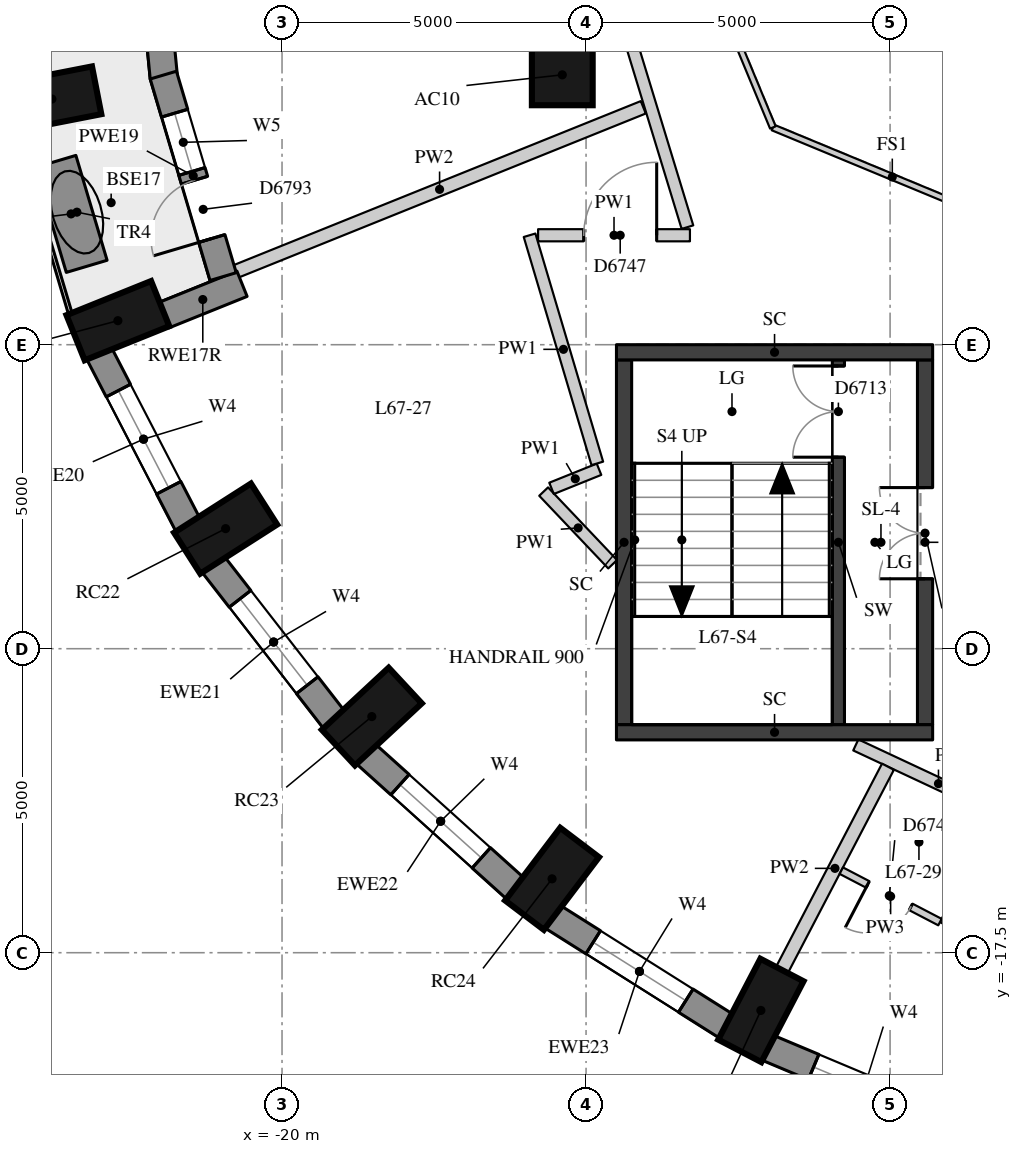
"""IFC4 building model, lengths in metres.
Left out: names, types, materials, properties, quantities, classifications, styles, units other than length and angle.
Written with IfcOpenShell. Run it as: python <this file> out.ifc"""

import sys

from ifc_helpers import new_model, si_unit, direction, frame, frame_2d, origin, origin_2d, place, context, subcontext, project, spatial, rectangle, extrude, element, fill, save


model = new_model("IFC4")
c1 = context("Model", 3, precision=1e-05, world=origin(), true_north=direction((0.0, 1.0)))
c2 = subcontext(c1, "Body", "Model", "MODEL_VIEW")
j1 = project(units=[si_unit("LENGTHUNIT", "METRE"), si_unit("PLANEANGLEUNIT", "RADIAN")], contexts=[c1])
p1 = place(None, origin())
s1 = spatial("IfcSite", under=j1, at=p1, CompositionType="ELEMENT")
p2 = place(p1, origin())
s2 = spatial("IfcBuilding", under=s1, at=p2, CompositionType="ELEMENT")
p3 = place(p2, frame((0.0, 0.0, 236.6)))
s3 = spatial("IfcBuildingStorey", under=s2, at=p3, CompositionType="ELEMENT", Elevation=236.6)
for number, where, z_axis, x_axis in (
    (1, (-23.785, -3.459, 0.0), (0.0, 0.0, 1.0), (-0.981, -0.192, 0.0)),
    (2, (-22.7, -7.105, 0.0), (0.0, 0.0, 1.0), (-0.928, -0.374, 0.0)),
    (3, (-20.928, -10.525, 0.0), (0.0, 0.0, 1.0), (-0.843, -0.539, 0.0)),
    (4, (-18.523, -13.616, 0.0), (0.0, 0.0, 1.0), (-0.733, -0.681, 0.0)),
    (5, (-15.559, -16.285, 0.0), (0.0, 0.0, 1.0), (-0.604, -0.797, 0.0)),
    (6, (-12.125, -18.449, 0.0), (0.0, 0.0, 1.0), (-0.462, -0.887, 0.0)),
):
    element("IfcColumn", number, at=place(p3, frame(where, z_axis=z_axis, x_axis=x_axis)), inside=s3, PredefinedType="COLUMN", context=c2, shape_type="SweptSolid", body=[
        extrude(rectangle(XDim=1.5, YDim=0.8, at=origin_2d()), origin(), (0.0, 0.0, 1.0), 3.3),
    ])
p4 = place(p3, frame((-15.391, -3.062, 0.0), z_axis=(0.0, 0.0, 1.0), x_axis=(1.0, 0.0, 0.0)))
e7 = element("IfcColumn", 7, at=p4, inside=s3, PredefinedType="COLUMN", context=c2, shape_type="SweptSolid", body=[
    extrude(rectangle(XDim=1.0, YDim=1.0, at=origin_2d()), origin(), (0.0, 0.0, 1.0), 3.3),
])
p5 = place(p3, frame((-23.01, -7.64, 0.0), z_axis=(0.0, 0.0, 1.0), x_axis=(0.459921155255, -0.887959757505, 0.0)))
e8 = element("IfcWall", 8, at=p5, inside=s3, PredefinedType="SOLIDWALL", context=c2, shape_type="SweptSolid", body=[
    extrude(rectangle(XDim=3.186, YDim=0.45, at=frame_2d((1.593, 0.0))), origin(), (0.0, 0.0, 1.0), 3.02),
])
p6 = place(p5, frame((0.693, 0.0, 0.4)))
e9 = element("IfcOpeningElement", 9, at=p6, cuts=e8, PredefinedType="OPENING", context=c2, shape_type="SweptSolid", body=[
    extrude(rectangle(XDim=1.8, YDim=1.75, at=frame_2d((0.9, 0.875))), frame((0.0, 0.235, 0.0), z_axis=(0.0, -1.0, 0.0), x_axis=(1.0, 0.0, 0.0)), (0.0, 0.0, 1.0), 0.47),
])
p7 = place(p3, frame((-21.135, -11.109, 0.0), z_axis=(0.0, 0.0, 1.0), x_axis=(0.613898970825, -0.789384604372, 0.0)))
e10 = element("IfcWall", 10, at=p7, inside=s3, PredefinedType="SOLIDWALL", context=c2, shape_type="SweptSolid", body=[
    extrude(rectangle(XDim=3.247, YDim=0.45, at=frame_2d((1.624, 0.0))), origin(), (0.0, 0.0, 1.0), 3.02),
])
p8 = place(p7, frame((0.724, 0.0, 0.4)))
e11 = element("IfcOpeningElement", 11, at=p8, cuts=e10, PredefinedType="OPENING", context=c2, shape_type="SweptSolid", body=[
    extrude(rectangle(XDim=1.8, YDim=1.75, at=frame_2d((0.9, 0.875))), frame((0.0, 0.235, 0.0), z_axis=(0.0, -1.0, 0.0), x_axis=(1.0, 0.0, 0.0)), (0.0, 0.0, 1.0), 0.47),
])
p9 = place(p3, frame((-18.624, -14.229, 0.0), z_axis=(0.0, 0.0, 1.0), x_axis=(0.743166014219, -0.669107073128, 0.0)))
e12 = element("IfcWall", 12, at=p9, inside=s3, PredefinedType="SOLIDWALL", context=c2, shape_type="SweptSolid", body=[
    extrude(rectangle(XDim=3.316, YDim=0.45, at=frame_2d((1.658, 0.0))), origin(), (0.0, 0.0, 1.0), 3.02),
])
p10 = place(p9, frame((0.758, 0.0, 0.4)))
e13 = element("IfcOpeningElement", 13, at=p10, cuts=e12, PredefinedType="OPENING", context=c2, shape_type="SweptSolid", body=[
    extrude(rectangle(XDim=1.8, YDim=1.75, at=frame_2d((0.9, 0.875))), frame((0.0, 0.235, 0.0), z_axis=(0.0, -1.0, 0.0), x_axis=(1.0, 0.0, 0.0)), (0.0, 0.0, 1.0), 0.47),
])
p11 = place(p3, frame((-15.553, -16.906, 0.0), z_axis=(0.0, 0.0, 1.0), x_axis=(0.845929139811, -0.53329531258, 0.0)))
e14 = element("IfcWall", 14, at=p11, inside=s3, PredefinedType="SOLIDWALL", context=c2, shape_type="SweptSolid", body=[
    extrude(rectangle(XDim=3.385, YDim=0.45, at=frame_2d((1.692, 0.0))), origin(), (0.0, 0.0, 1.0), 3.02),
])
p12 = place(p11, frame((0.792, 0.0, 0.4)))
e15 = element("IfcOpeningElement", 15, at=p12, cuts=e14, PredefinedType="OPENING", context=c2, shape_type="SweptSolid", body=[
    extrude(rectangle(XDim=1.8, YDim=1.75, at=frame_2d((0.9, 0.875))), frame((0.0, 0.235, 0.0), z_axis=(0.0, -1.0, 0.0), x_axis=(1.0, 0.0, 0.0)), (0.0, 0.0, 1.0), 0.47),
])
p13 = place(p3, frame((-12.016, -19.062, 0.0), z_axis=(0.0, 0.0, 1.0), x_axis=(0.922049934692, -0.3870709469, 0.0)))
e16 = element("IfcWall", 16, at=p13, inside=s3, PredefinedType="SOLIDWALL", context=c2, shape_type="SweptSolid", body=[
    extrude(rectangle(XDim=3.443, YDim=0.45, at=frame_2d((1.722, 0.0))), origin(), (0.0, 0.0, 1.0), 3.02),
])
p14 = place(p13, frame((0.822, 0.0, 0.4)))
e17 = element("IfcOpeningElement", 17, at=p14, cuts=e16, PredefinedType="OPENING", context=c2, shape_type="SweptSolid", body=[
    extrude(rectangle(XDim=1.8, YDim=1.75, at=frame_2d((0.9, 0.875))), frame((0.0, 0.235, 0.0), z_axis=(0.0, -1.0, 0.0), x_axis=(1.0, 0.0, 0.0)), (0.0, 0.0, 1.0), 0.47),
])
p15 = place(p3, frame((-21.948, -7.017, 0.0), z_axis=(0.0, 0.0, 1.0), x_axis=(0.927577935879, 0.373629726964, 0.0)))
e18 = element("IfcWall", 18, at=p15, inside=s3, PredefinedType="SOLIDWALL", context=c2, shape_type="SweptSolid", body=[
    extrude(rectangle(XDim=1.39, YDim=0.45, at=frame_2d((0.695, 0.0))), origin(), (0.0, 0.0, 1.0), 3.02),
])
p16 = place(p3, frame((-22.276, 0.322, 0.0), z_axis=(0.0, 0.0, 1.0), x_axis=(0.096423819494, -0.995340367429, 0.0)))
e19 = element("IfcWall", 19, at=p16, inside=s3, PredefinedType="SOLIDWALL", context=c2, shape_type="SweptSolid", body=[
    extrude(rectangle(XDim=3.446, YDim=0.45, at=frame_2d((1.723, 0.0))), origin(), (0.0, 0.0, 1.0), 3.02),
])
p17 = place(p16, frame((0.648, 0.0, 0.4)))
e20 = element("IfcOpeningElement", 20, at=p17, cuts=e19, PredefinedType="OPENING", context=c2, shape_type="SweptSolid", body=[
    extrude(rectangle(XDim=1.0, YDim=1.75, at=frame_2d((0.5, 0.875))), frame((0.0, 0.235, 0.0), z_axis=(0.0, -1.0, 0.0), x_axis=(1.0, 0.0, 0.0)), (0.0, 0.0, 1.0), 0.47),
])
p18 = place(p16, frame((1.798, 0.0, 0.0)))
e21 = element("IfcOpeningElement", 21, at=p18, cuts=e19, PredefinedType="OPENING", context=c2, shape_type="SweptSolid", body=[
    extrude(rectangle(XDim=1.0, YDim=2.15, at=frame_2d((0.5, 1.075))), frame((0.0, 0.235, 0.0), z_axis=(0.0, -1.0, 0.0), x_axis=(1.0, 0.0, 0.0)), (0.0, 0.0, 1.0), 0.47),
])
p19 = place(p3, frame((-21.952, -3.066, 0.0), z_axis=(0.0, 0.0, 1.0), x_axis=(0.284437019833, -0.958694728132, 0.0)))
e22 = element("IfcWall", 22, at=p19, inside=s3, PredefinedType="SOLIDWALL", context=c2, shape_type="SweptSolid", body=[
    extrude(rectangle(XDim=3.457, YDim=0.45, at=frame_2d((1.728, 0.0))), origin(), (0.0, 0.0, 1.0), 3.02),
])
p20 = place(p19, frame((0.653, 0.0, 0.4)))
e23 = element("IfcOpeningElement", 23, at=p20, cuts=e22, PredefinedType="OPENING", context=c2, shape_type="SweptSolid", body=[
    extrude(rectangle(XDim=1.0, YDim=1.75, at=frame_2d((0.5, 0.875))), frame((0.0, 0.235, 0.0), z_axis=(0.0, -1.0, 0.0), x_axis=(1.0, 0.0, 0.0)), (0.0, 0.0, 1.0), 0.47),
])
p21 = place(p19, frame((1.803, 0.0, 0.0)))
e24 = element("IfcOpeningElement", 24, at=p21, cuts=e22, PredefinedType="OPENING", context=c2, shape_type="SweptSolid", body=[
    extrude(rectangle(XDim=1.0, YDim=2.15, at=frame_2d((0.5, 1.075))), frame((0.0, 0.235, 0.0), z_axis=(0.0, -1.0, 0.0), x_axis=(1.0, 0.0, 0.0)), (0.0, 0.0, 1.0), 0.47),
])
p22 = place(p3, frame((-23.726, -4.486, 0.0), z_axis=(0.0, 0.0, 1.0), x_axis=(0.285219480859, -0.958462230731, 0.0)))
e25 = element("IfcWall", 25, at=p22, inside=s3, PredefinedType="USERDEFINED", context=c2, shape_type="SweptSolid", body=[
    extrude(rectangle(XDim=1.8, YDim=0.7, at=frame_2d((0.9, 0.0))), origin(), (0.0, 0.0, 1.0), 0.75),
])
p23 = place(p3, frame((-10.85, -13.75, 0.0), z_axis=(0.0, 0.0, 1.0), x_axis=(0.0, 1.0, 0.0)))
e26 = element("IfcWall", 26, at=p23, inside=s3, PredefinedType="SHEAR", context=c2, shape_type="SweptSolid", body=[
    extrude(rectangle(XDim=6.0, YDim=0.2, at=frame_2d((3.0, 0.0))), origin(), (0.0, 0.0, 1.0), 3.02),
])
p24 = place(p23, frame((4.4, 0.0, 0.0)))
e27 = element("IfcOpeningElement", 27, at=p24, cuts=e26, PredefinedType="OPENING", context=c2, shape_type="SweptSolid", body=[
    extrude(rectangle(XDim=1.5, YDim=2.1, at=frame_2d((0.75, 1.05))), frame((0.0, 0.11, 0.0), z_axis=(0.0, -1.0, 0.0), x_axis=(1.0, 0.0, 0.0)), (0.0, 0.0, 1.0), 0.22),
])
p25 = place(p3, frame((-14.375, -13.75, -0.28), z_axis=(0.0, 0.0, 1.0), x_axis=(0.0, 1.0, 0.0)))
e28 = element("IfcWall", 28, at=p25, inside=s3, PredefinedType="SHEAR", context=c2, shape_type="SweptSolid", body=[
    extrude(rectangle(XDim=6.0, YDim=0.25, at=frame_2d((3.0, 0.0))), origin(), (0.0, 0.0, 1.0), 3.3),
])
p26 = place(p3, frame((-9.425, -13.75, -0.28), z_axis=(0.0, 0.0, 1.0), x_axis=(0.0, 1.0, 0.0)))
e29 = element("IfcWall", 29, at=p26, inside=s3, PredefinedType="SHEAR", context=c2, shape_type="SweptSolid", body=[
    extrude(rectangle(XDim=6.0, YDim=0.25, at=frame_2d((3.0, 0.0))), origin(), (0.0, 0.0, 1.0), 3.3),
])
p27 = place(p26, frame((2.4, 0.0, 0.28)))
e30 = element("IfcOpeningElement", 30, at=p27, cuts=e29, PredefinedType="OPENING", context=c2, shape_type="SweptSolid", body=[
    extrude(rectangle(XDim=1.5, YDim=2.1, at=frame_2d((0.75, 1.05))), frame((0.0, 0.135, 0.0), z_axis=(0.0, -1.0, 0.0), x_axis=(1.0, 0.0, 0.0)), (0.0, 0.0, 1.0), 0.27),
])
for number, where, z_axis, x_axis in (
    (31, (-14.5, -7.625, -0.28), (0.0, 0.0, 1.0), (1.0, 0.0, 0.0)),
    (32, (-14.5, -13.875, -0.28), (0.0, 0.0, 1.0), (1.0, 0.0, 0.0)),
):
    element("IfcWall", number, at=place(p3, frame(where, z_axis=z_axis, x_axis=x_axis)), inside=s3, PredefinedType="SHEAR", context=c2, shape_type="SweptSolid", body=[
        extrude(rectangle(XDim=5.2, YDim=0.25, at=frame_2d((2.6, 0.0))), origin(), (0.0, 0.0, 1.0), 3.3),
    ])
p28 = place(p3, frame((-7.844, -15.356, 0.0), z_axis=(0.0, 0.0, 1.0), x_axis=(-0.90567561184, 0.423971327001, 0.0)))
e33 = element("IfcWall", 33, at=p28, inside=s3, PredefinedType="PARTITIONING", context=c2, shape_type="SweptSolid", body=[
    extrude(rectangle(XDim=3.002, YDim=0.2, at=frame_2d((1.501, 0.0))), origin(), (0.0, 0.0, 1.0), 3.02),
])
p29 = place(p3, frame((-14.563, -11.111, 0.0), z_axis=(0.0, 0.0, 1.0), x_axis=(-0.688574238414, 0.725165855645, 0.0)))
e34 = element("IfcWall", 34, at=p29, inside=s3, PredefinedType="PARTITIONING", context=c2, shape_type="SweptSolid", body=[
    extrude(rectangle(XDim=1.648, YDim=0.2, at=frame_2d((0.824, 0.0))), origin(), (0.0, 0.0, 1.0), 3.02),
])
p30 = place(p3, frame((-15.568, -9.863, 0.0), z_axis=(0.0, 0.0, 1.0), x_axis=(0.92779485846, 0.373090740457, 0.0)))
e35 = element("IfcWall", 35, at=p30, inside=s3, PredefinedType="PARTITIONING", context=c2, shape_type="SweptSolid", body=[
    extrude(rectangle(XDim=0.842, YDim=0.2, at=frame_2d((0.421, 0.0))), origin(), (0.0, 0.0, 1.0), 3.02),
])
p31 = place(p3, frame((-14.815, -9.452, 0.0), z_axis=(0.0, 0.0, 1.0), x_axis=(-0.284600079658, 0.958646334504, 0.0)))
e36 = element("IfcWall", 36, at=p31, inside=s3, PredefinedType="PARTITIONING", context=c2, shape_type="SweptSolid", body=[
    extrude(rectangle(XDim=3.914, YDim=0.2, at=frame_2d((1.957, 0.0))), origin(), (0.0, 0.0, 1.0), 3.02),
])
p32 = place(p3, frame((-15.789, -5.7, 0.0), z_axis=(0.0, 0.0, 1.0), x_axis=(1.0, 0.0, 0.0)))
e37 = element("IfcWall", 37, at=p32, inside=s3, PredefinedType="PARTITIONING", context=c2, shape_type="SweptSolid", body=[
    extrude(rectangle(XDim=2.497, YDim=0.2, at=frame_2d((1.249, 0.0))), origin(), (0.0, 0.0, 1.0), 3.02),
])
p33 = place(p32, frame((0.75, 0.0, 0.0)))
e38 = element("IfcOpeningElement", 38, at=p33, cuts=e37, PredefinedType="OPENING", context=c2, shape_type="SweptSolid", body=[
    extrude(rectangle(XDim=1.2, YDim=2.1, at=frame_2d((0.6, 1.05))), frame((0.0, 0.11, 0.0), z_axis=(0.0, -1.0, 0.0), x_axis=(1.0, 0.0, 0.0)), (0.0, 0.0, 1.0), 0.22),
])
p34 = place(p3, frame((-13.333, -5.567, 0.0), z_axis=(0.0, 0.0, 1.0), x_axis=(-0.291732883234, 0.956499830026, 0.0)))
e39 = element("IfcWall", 39, at=p34, inside=s3, PredefinedType="PARTITIONING", context=c2, shape_type="SweptSolid", body=[
    extrude(rectangle(XDim=8.417, YDim=0.2, at=frame_2d((4.208, 0.0))), origin(), (0.0, 0.0, 1.0), 3.02),
])
p35 = place(p34, frame((4.053, 0.0, 0.0)))
e40 = element("IfcOpeningElement", 40, at=p35, cuts=e39, PredefinedType="OPENING", context=c2, shape_type="SweptSolid", body=[
    extrude(rectangle(XDim=1.2, YDim=2.1, at=frame_2d((0.6, 1.05))), frame((0.0, 0.11, 0.0), z_axis=(0.0, -1.0, 0.0), x_axis=(1.0, 0.0, 0.0)), (0.0, 0.0, 1.0), 0.22),
])
p36 = place(p3, frame((-20.759, -6.295, 0.0), z_axis=(0.0, 0.0, 1.0), x_axis=(0.927536731172, 0.373732006023, 0.0)))
e41 = element("IfcWall", 41, at=p36, inside=s3, PredefinedType="PARTITIONING", context=c2, shape_type="SweptSolid", body=[
    extrude(rectangle(XDim=7.224, YDim=0.22, at=frame_2d((3.612, 0.0))), origin(), (0.0, 0.0, 1.0), 3.02),
])
p37 = place(p3, frame((-11.778, -17.784, 0.0), z_axis=(0.0, 0.0, 1.0), x_axis=(0.462428808932, 0.886656414103, 0.0)))
e42 = element("IfcWall", 42, at=p37, inside=s3, PredefinedType="PARTITIONING", context=c2, shape_type="SweptSolid", body=[
    extrude(rectangle(XDim=3.771, YDim=0.22, at=frame_2d((1.885, 0.0))), origin(), (0.0, 0.0, 1.0), 3.02),
])
p38 = place(p3, frame((-8.222, -15.29, 0.0), z_axis=(0.0, 0.0, 1.0), x_axis=(-0.46232711024, -0.886709446853, 0.0)))
e43 = element("IfcWall", 43, at=p38, inside=s3, PredefinedType="PARTITIONING", context=c2, shape_type="SweptSolid", body=[
    extrude(rectangle(XDim=1.956, YDim=0.12, at=frame_2d((0.978, 0.0))), origin(), (0.0, 0.0, 1.0), 3.02),
])
p39 = place(p3, frame((-9.18, -16.997, 0.0), z_axis=(0.0, 0.0, 1.0), x_axis=(-0.886720410479, 0.462306082201, 0.0)))
e44 = element("IfcWall", 44, at=p39, inside=s3, PredefinedType="PARTITIONING", context=c2, shape_type="SweptSolid", body=[
    extrude(rectangle(XDim=1.83, YDim=0.12, at=frame_2d((0.915, 0.0))), origin(), (0.0, 0.0, 1.0), 3.02),
])
p40 = place(p39, frame((0.54, 0.0, 0.0)))
e45 = element("IfcOpeningElement", 45, at=p40, cuts=e44, PredefinedType="OPENING", context=c2, shape_type="SweptSolid", body=[
    extrude(rectangle(XDim=0.8, YDim=2.1, at=frame_2d((0.4, 1.05))), frame((0.0, 0.07, 0.0), z_axis=(0.0, -1.0, 0.0), x_axis=(1.0, 0.0, 0.0)), (0.0, 0.0, 1.0), 0.14),
])
for number, where, z_axis, x_axis in (
    (46, (-8.0, -5.554, 0.0), (0.0, 0.0, 1.0), (-0.924, 0.383, 0.0)),
    (47, (-11.927, -3.927, 0.0), (0.0, 0.0, 1.0), (-0.383, 0.924, 0.0)),
):
    element("IfcWall", number, at=place(p3, frame(where, z_axis=z_axis, x_axis=x_axis)), inside=s3, PredefinedType="PARTITIONING", context=c2, shape_type="SweptSolid", body=[
        extrude(rectangle(XDim=4.251, YDim=0.1, at=frame_2d((2.125, 0.0))), origin(), (0.0, 0.0, 1.0), 3.02),
    ])
p41 = place(p6, origin())
e48 = element("IfcWindow", 48, at=p41, inside=s3, PartitioningType="SINGLE_PANEL", PredefinedType="WINDOW", context=c2, shape_type="SweptSolid", body=[
    extrude(rectangle(XDim=1.8, YDim=1.75, at=frame_2d((0.9, 0.875))), frame((0.0, 0.035, 0.0), z_axis=(0.0, -1.0, 0.0), x_axis=(1.0, 0.0, 0.0)), (0.0, 0.0, 1.0), 0.06),
])
fill(e9, e48)
p42 = place(p8, origin())
e49 = element("IfcWindow", 49, at=p42, inside=s3, PartitioningType="SINGLE_PANEL", PredefinedType="WINDOW", context=c2, shape_type="SweptSolid", body=[
    extrude(rectangle(XDim=1.8, YDim=1.75, at=frame_2d((0.9, 0.875))), frame((0.0, 0.035, 0.0), z_axis=(0.0, -1.0, 0.0), x_axis=(1.0, 0.0, 0.0)), (0.0, 0.0, 1.0), 0.06),
])
fill(e11, e49)
p43 = place(p10, origin())
e50 = element("IfcWindow", 50, at=p43, inside=s3, PartitioningType="SINGLE_PANEL", PredefinedType="WINDOW", context=c2, shape_type="SweptSolid", body=[
    extrude(rectangle(XDim=1.8, YDim=1.75, at=frame_2d((0.9, 0.875))), frame((0.0, 0.035, 0.0), z_axis=(0.0, -1.0, 0.0), x_axis=(1.0, 0.0, 0.0)), (0.0, 0.0, 1.0), 0.06),
])
fill(e13, e50)
p44 = place(p12, origin())
e51 = element("IfcWindow", 51, at=p44, inside=s3, PartitioningType="SINGLE_PANEL", PredefinedType="WINDOW", context=c2, shape_type="SweptSolid", body=[
    extrude(rectangle(XDim=1.8, YDim=1.75, at=frame_2d((0.9, 0.875))), frame((0.0, 0.035, 0.0), z_axis=(0.0, -1.0, 0.0), x_axis=(1.0, 0.0, 0.0)), (0.0, 0.0, 1.0), 0.06),
])
fill(e15, e51)
p45 = place(p14, origin())
e52 = element("IfcWindow", 52, at=p45, inside=s3, PartitioningType="SINGLE_PANEL", PredefinedType="WINDOW", context=c2, shape_type="SweptSolid", body=[
    extrude(rectangle(XDim=1.8, YDim=1.75, at=frame_2d((0.9, 0.875))), frame((0.0, 0.035, 0.0), z_axis=(0.0, -1.0, 0.0), x_axis=(1.0, 0.0, 0.0)), (0.0, 0.0, 1.0), 0.06),
])
fill(e17, e52)
p46 = place(p20, origin())
e53 = element("IfcWindow", 53, at=p46, inside=s3, PartitioningType="SINGLE_PANEL", PredefinedType="WINDOW", context=c2, shape_type="SweptSolid", body=[
    extrude(rectangle(XDim=1.0, YDim=1.75, at=frame_2d((0.5, 0.875))), frame((0.0, 0.035, 0.0), z_axis=(0.0, -1.0, 0.0), x_axis=(1.0, 0.0, 0.0)), (0.0, 0.0, 1.0), 0.06),
])
fill(e23, e53)
p47 = place(p21, frame((1.0, 0.0, 0.0), z_axis=(0.0, 0.0, 1.0), x_axis=(-1.0, 0.0, 0.0)))
e54 = element("IfcDoor", 54, at=p47, inside=s3, OperationType="SINGLE_SWING_LEFT", PredefinedType="DOOR", context=c2, shape_type="SweptSolid", body=[
    extrude(rectangle(XDim=1.0, YDim=2.15, at=frame_2d((0.5, 1.075))), frame((0.0, 0.075, 0.0), z_axis=(0.0, -1.0, 0.0), x_axis=(1.0, 0.0, 0.0)), (0.0, 0.0, 1.0), 0.05),
])
fill(e24, e54)
p48 = place(p24, origin())
e55 = element("IfcDoor", 55, at=p48, inside=s3, OperationType="DOUBLE_DOOR_SINGLE_SWING", PredefinedType="DOOR", context=c2, shape_type="SweptSolid", body=[
    extrude(rectangle(XDim=1.5, YDim=2.1, at=frame_2d((0.75, 1.05))), frame((0.0, 0.025, 0.0), z_axis=(0.0, -1.0, 0.0), x_axis=(1.0, 0.0, 0.0)), (0.0, 0.0, 1.0), 0.05),
])
fill(e27, e55)
p49 = place(p27, origin())
e56 = element("IfcDoor", 56, at=p49, inside=s3, OperationType="DOUBLE_DOOR_SINGLE_SWING", PredefinedType="DOOR", context=c2, shape_type="SweptSolid", body=[
    extrude(rectangle(XDim=1.5, YDim=2.1, at=frame_2d((0.75, 1.05))), frame((0.0, 0.025, 0.0), z_axis=(0.0, -1.0, 0.0), x_axis=(1.0, 0.0, 0.0)), (0.0, 0.0, 1.0), 0.05),
])
fill(e30, e56)
p50 = place(p33, origin())
e57 = element("IfcDoor", 57, at=p50, inside=s3, OperationType="SINGLE_SWING_RIGHT", PredefinedType="DOOR", context=c2, shape_type="SweptSolid", body=[
    extrude(rectangle(XDim=1.2, YDim=2.1, at=frame_2d((0.6, 1.05))), frame((0.0, 0.025, 0.0), z_axis=(0.0, -1.0, 0.0), x_axis=(1.0, 0.0, 0.0)), (0.0, 0.0, 1.0), 0.05),
])
fill(e38, e57)
p51 = place(p40, origin())
e58 = element("IfcDoor", 58, at=p51, inside=s3, OperationType="SINGLE_SWING_RIGHT", PredefinedType="DOOR", context=c2, shape_type="SweptSolid", body=[
    extrude(rectangle(XDim=0.8, YDim=2.1, at=frame_2d((0.4, 1.05))), frame((0.0, 0.025, 0.0), z_axis=(0.0, -1.0, 0.0), x_axis=(1.0, 0.0, 0.0)), (0.0, 0.0, 1.0), 0.05),
])
fill(e45, e58)
save(model, sys.argv[1])
